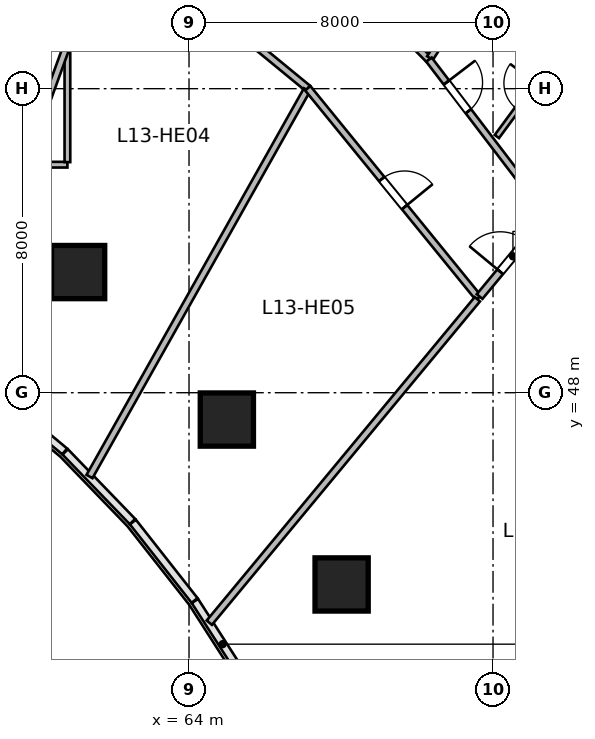
"""IFC4 building model, lengths in metres.
Left out: names, types, materials, properties, quantities, classifications, styles, units other than length and angle.
Written with IfcOpenShell. Run it as: python <this file> out.ifc"""

import sys

from ifc_helpers import new_model, si_unit, direction, frame, frame_2d, origin, origin_2d, place, context, subcontext, project, spatial, rectangle, circle, extrude, source, transform, mapped, element, fill, save


model = new_model("IFC4")
c1 = context("Model", 3, precision=1e-05, world=origin(), true_north=direction((0.0, 1.0)))
c2 = subcontext(c1, "Body", "Model", "MODEL_VIEW")
j1 = project(units=[si_unit("LENGTHUNIT", "METRE"), si_unit("PLANEANGLEUNIT", "RADIAN")], contexts=[c1])
p1 = place(None, origin())
s1 = spatial("IfcSite", under=j1, at=p1, CompositionType="ELEMENT")
p2 = place(p1, origin())
s2 = spatial("IfcBuilding", under=s1, at=p2, CompositionType="ELEMENT")
p3 = place(p2, frame((0.0, 0.0, 60.6)))
s3 = spatial("IfcBuildingStorey", under=s2, at=p3, CompositionType="ELEMENT", Elevation=60.6)
m1 = source(origin(), c2, "Body", "SweptSolid", [
    extrude(circle(Radius=0.7, at=origin_2d()), origin(), (0.0, 0.0, 1.0), 3.6),
])
for number, where, z_axis, x_axis in (
    (1, (61.082, 51.175, 0.0), (0.0, 0.0, 1.0), (0.409, 0.912, 0.0)),
    (2, (64.996, 47.294, 0.0), (0.0, 0.0, 1.0), (0.558, 0.83, 0.0)),
    (3, (68.015, 42.955, 0.0), (0.0, 0.0, 1.0), (0.691, 0.723, 0.0)),
):
    element("IfcColumn", number, at=place(p3, frame(where, z_axis=z_axis, x_axis=x_axis)), inside=s3, PredefinedType="COLUMN", context=c2, shape_type="MappedRepresentation", body=[
        mapped(m1, transform((0.0, 0.0, 0.0), scale=1.0)),
    ])
m2 = source(origin(), c2, "Body", "SweptSolid", [
    extrude(rectangle(XDim=6.6, YDim=0.15, at=frame_2d((3.3, 0.0))), origin(), (0.0, 0.0, 1.0), 2.803),
])
p4 = place(p3, frame((54.2, 54.0, 0.0), z_axis=(0.0, 0.0, 1.0), x_axis=(1.0, 0.0, 0.0)))
e4 = element("IfcWall", 4, at=p4, inside=s3, PredefinedType="PARTITIONING", context=c2, shape_type="MappedRepresentation", body=[
    mapped(m2, transform((0.0, 0.0, 0.0), scale=1.0)),
])
m3 = source(origin(), c2, "Body", "SweptSolid", [
    extrude(rectangle(XDim=3.785, YDim=0.15, at=frame_2d((1.893, 0.0))), origin(), (0.0, 0.0, 1.0), 3.36),
])
p5 = place(p3, frame((60.8, 54.067, 0.0), z_axis=(0.0, 0.0, 1.0), x_axis=(0.0, 1.0, 0.0)))
e5 = element("IfcWall", 5, at=p5, inside=s3, PredefinedType="PARTITIONING", context=c2, shape_type="MappedRepresentation", body=[
    mapped(m3, transform((0.0, 0.0, 0.0), scale=1.0)),
])
m4 = source(origin(), c2, "Body", "SweptSolid", [
    extrude(rectangle(XDim=5.012, YDim=0.18, at=frame_2d((2.506, 0.0))), origin(), (0.0, 0.0, 1.0), 3.36),
])
p6 = place(p3, frame((66.788, 60.326, 0.0), z_axis=(0.0, 0.0, 1.0), x_axis=(0.703664626435, -0.710532260707, 0.0)))
e6 = element("IfcWall", 6, at=p6, inside=s3, PredefinedType="PLUMBINGWALL", context=c2, shape_type="MappedRepresentation", body=[
    mapped(m4, transform((0.0, 0.0, 0.0), scale=1.0)),
])
p7 = place(p6, frame((0.728, 0.0, 0.0)))
e7 = element("IfcOpeningElement", 7, at=p7, cuts=e6, PredefinedType="OPENING", context=c2, shape_type="SweptSolid", body=[
    extrude(rectangle(XDim=0.95, YDim=2.15, at=frame_2d((0.475, 1.075))), frame((0.0, 0.1, 0.0), z_axis=(0.0, -1.0, 0.0), x_axis=(1.0, 0.0, 0.0)), (0.0, 0.0, 1.0), 0.2),
])
m5 = source(origin(), c2, "Body", "SweptSolid", [
    extrude(rectangle(XDim=11.432, YDim=0.18, at=frame_2d((5.716, 0.0))), origin(), (0.0, 0.0, 1.0), 3.36),
])
p8 = place(p3, frame((70.341, 56.805, 0.0), z_axis=(0.0, 0.0, 1.0), x_axis=(0.540196183124, 0.841539115988, 0.0)))
e8 = element("IfcWall", 8, at=p8, inside=s3, PredefinedType="PLUMBINGWALL", context=c2, shape_type="MappedRepresentation", body=[
    mapped(m5, transform((0.0, 0.0, 0.0), scale=1.0)),
])
m6 = source(origin(), c2, "Body", "SweptSolid", [
    extrude(rectangle(XDim=5.135, YDim=0.18, at=frame_2d((2.567, 0.0))), origin(), (0.0, 0.0, 1.0), 3.36),
])
p9 = place(p3, frame((70.315, 56.764, 0.0), z_axis=(0.0, 0.0, 1.0), x_axis=(0.606802199649, -0.794852873494, 0.0)))
e9 = element("IfcWall", 9, at=p9, inside=s3, PredefinedType="PLUMBINGWALL", context=c2, shape_type="MappedRepresentation", body=[
    mapped(m6, transform((0.0, 0.0, 0.0), scale=1.0)),
])
p10 = place(p9, frame((0.757, 0.0, 0.0)))
e10 = element("IfcOpeningElement", 10, at=p10, cuts=e9, PredefinedType="OPENING", context=c2, shape_type="SweptSolid", body=[
    extrude(rectangle(XDim=0.95, YDim=2.15, at=frame_2d((0.475, 1.075))), frame((0.0, 0.1, 0.0), z_axis=(0.0, -1.0, 0.0), x_axis=(1.0, 0.0, 0.0)), (0.0, 0.0, 1.0), 0.2),
])
m7 = source(origin(), c2, "Body", "SweptSolid", [
    extrude(rectangle(XDim=2.642, YDim=0.14, at=frame_2d((1.321, 0.0))), origin(), (0.0, 0.0, 1.0), 3.36),
])
p11 = place(p3, frame((72.101, 54.741, 0.0), z_axis=(0.0, 0.0, 1.0), x_axis=(0.592789122423, 0.805357719487, 0.0)))
e11 = element("IfcWall", 11, at=p11, inside=s3, PredefinedType="PARTITIONING", context=c2, shape_type="MappedRepresentation", body=[
    mapped(m7, transform((0.0, 0.0, 0.0), scale=1.0)),
])
p12 = place(p11, frame((0.896, 0.0, 0.0)))
e12 = element("IfcOpeningElement", 12, at=p12, cuts=e11, PredefinedType="OPENING", context=c2, shape_type="SweptSolid", body=[
    extrude(rectangle(XDim=0.85, YDim=2.05, at=frame_2d((0.425, 1.025))), frame((0.0, 0.08, 0.0), z_axis=(0.0, -1.0, 0.0), x_axis=(1.0, 0.0, 0.0)), (0.0, 0.0, 1.0), 0.16),
])
m8 = source(origin(), c2, "Body", "SweptSolid", [
    extrude(rectangle(XDim=6.721, YDim=0.18, at=frame_2d((3.361, 0.0))), origin(), (0.0, 0.0, 1.0), 3.36),
])
p13 = place(p3, frame((61.931, 60.275, 0.0), z_axis=(0.0, 0.0, 1.0), x_axis=(0.772828051199, -0.63461547671, 0.0)))
e13 = element("IfcWall", 13, at=p13, inside=s3, PredefinedType="PLUMBINGWALL", context=c2, shape_type="MappedRepresentation", body=[
    mapped(m8, transform((0.0, 0.0, 0.0), scale=1.0)),
])
p14 = place(p13, frame((2.885, 0.0, 0.0)))
e14 = element("IfcOpeningElement", 14, at=p14, cuts=e13, PredefinedType="OPENING", context=c2, shape_type="SweptSolid", body=[
    extrude(rectangle(XDim=0.95, YDim=2.15, at=frame_2d((0.475, 1.075))), frame((0.0, 0.1, 0.0), z_axis=(0.0, -1.0, 0.0), x_axis=(1.0, 0.0, 0.0)), (0.0, 0.0, 1.0), 0.2),
])
m9 = source(origin(), c2, "Body", "SweptSolid", [
    extrude(rectangle(XDim=12.196, YDim=0.18, at=frame_2d((6.098, 0.0))), origin(), (0.0, 0.0, 1.0), 3.36),
])
p15 = place(p3, frame((57.742, 48.766, 0.0), z_axis=(0.0, 0.0, 1.0), x_axis=(0.342022711534, 0.939691686031, 0.0)))
e15 = element("IfcWall", 15, at=p15, inside=s3, PredefinedType="PLUMBINGWALL", context=c2, shape_type="MappedRepresentation", body=[
    mapped(m9, transform((0.0, 0.0, 0.0), scale=1.0)),
])
m10 = source(origin(), c2, "Body", "SweptSolid", [
    extrude(rectangle(XDim=11.67, YDim=0.18, at=frame_2d((5.835, 0.0))), origin(), (0.0, 0.0, 1.0), 3.36),
])
p16 = place(p3, frame((61.381, 45.795, 0.0), z_axis=(0.0, 0.0, 1.0), x_axis=(0.490156946222, 0.871634193954, 0.0)))
e16 = element("IfcWall", 16, at=p16, inside=s3, PredefinedType="PLUMBINGWALL", context=c2, shape_type="MappedRepresentation", body=[
    mapped(m10, transform((0.0, 0.0, 0.0), scale=1.0)),
])
m11 = source(origin(), c2, "Body", "SweptSolid", [
    extrude(rectangle(XDim=7.113, YDim=0.18, at=frame_2d((3.556, 0.0))), origin(), (0.0, 0.0, 1.0), 3.36),
])
p17 = place(p3, frame((67.126, 56.01, 0.0), z_axis=(0.0, 0.0, 1.0), x_axis=(0.63149032532, -0.775383755974, 0.0)))
e17 = element("IfcWall", 17, at=p17, inside=s3, PredefinedType="PLUMBINGWALL", context=c2, shape_type="MappedRepresentation", body=[
    mapped(m11, transform((0.0, 0.0, 0.0), scale=1.0)),
])
p18 = place(p17, frame((3.081, 0.0, 0.0)))
e18 = element("IfcOpeningElement", 18, at=p18, cuts=e17, PredefinedType="OPENING", context=c2, shape_type="SweptSolid", body=[
    extrude(rectangle(XDim=0.95, YDim=2.15, at=frame_2d((0.475, 1.075))), frame((0.0, 0.1, 0.0), z_axis=(0.0, -1.0, 0.0), x_axis=(1.0, 0.0, 0.0)), (0.0, 0.0, 1.0), 0.2),
])
m12 = source(origin(), c2, "Body", "SweptSolid", [
    extrude(rectangle(XDim=11.053, YDim=0.18, at=frame_2d((5.527, 0.0))), origin(), (0.0, 0.0, 1.0), 3.36),
])
p19 = place(p3, frame((64.534, 41.949, 0.0), z_axis=(0.0, 0.0, 1.0), x_axis=(0.638131235571, 0.769927611005, 0.0)))
e19 = element("IfcWall", 19, at=p19, inside=s3, PredefinedType="PLUMBINGWALL", context=c2, shape_type="MappedRepresentation", body=[
    mapped(m12, transform((0.0, 0.0, 0.0), scale=1.0)),
])
m13 = source(origin(), c2, "Body", "SweptSolid", [
    extrude(rectangle(XDim=2.748, YDim=0.195, at=frame_2d((1.374, 0.0))), origin(), (0.0, 0.0, 1.0), 3.36),
])
p20 = place(p3, frame((71.647, 50.531, 0.0), z_axis=(0.0, 0.0, 1.0), x_axis=(0.638111168284, 0.769944242729, 0.0)))
e20 = element("IfcWall", 20, at=p20, inside=s3, PredefinedType="PARTITIONING", context=c2, shape_type="MappedRepresentation", body=[
    mapped(m13, transform((0.0, 0.0, 0.0), scale=1.0)),
])
p21 = place(p20, frame((0.849, 0.0, 0.0)))
e21 = element("IfcOpeningElement", 21, at=p21, cuts=e20, PredefinedType="OPENING", context=c2, shape_type="SweptSolid", body=[
    extrude(rectangle(XDim=1.05, YDim=2.15, at=frame_2d((0.525, 1.075))), frame((0.0, 0.107, 0.0), z_axis=(0.0, -1.0, 0.0), x_axis=(1.0, 0.0, 0.0)), (0.0, 0.0, 1.0), 0.215),
])
m14 = source(origin(), c2, "Body", "SweptSolid", [
    extrude(rectangle(XDim=0.95, YDim=2.15, at=frame_2d((0.475, 1.075))), frame((0.0, 0.025, 0.0), z_axis=(0.0, -1.0, 0.0), x_axis=(1.0, 0.0, 0.0)), (0.0, 0.0, 1.0), 0.05),
])
p22 = place(p10, origin())
e22 = element("IfcDoor", 22, at=p22, inside=s3, OperationType="SINGLE_SWING_LEFT", PredefinedType="DOOR", context=c2, shape_type="MappedRepresentation", body=[
    mapped(m14, transform((0.0, 0.0, 0.0), scale=1.0)),
])
fill(e10, e22)
p23 = place(p18, origin())
e23 = element("IfcDoor", 23, at=p23, inside=s3, OperationType="SINGLE_SWING_RIGHT", PredefinedType="DOOR", context=c2, shape_type="MappedRepresentation", body=[
    mapped(m14, transform((0.0, 0.0, 0.0), scale=1.0)),
])
fill(e18, e23)
m15 = source(origin(), c2, "Body", "SweptSolid", [
    extrude(rectangle(XDim=1.05, YDim=2.15, at=frame_2d((0.525, 1.075))), frame((0.0, 0.025, 0.0), z_axis=(0.0, -1.0, 0.0), x_axis=(1.0, 0.0, 0.0)), (0.0, 0.0, 1.0), 0.05),
])
p24 = place(p21, origin())
e24 = element("IfcDoor", 24, at=p24, inside=s3, OperationType="SINGLE_SWING_LEFT", PredefinedType="DOOR", context=c2, shape_type="MappedRepresentation", body=[
    mapped(m15, transform((0.0, 0.0, 0.0), scale=1.0)),
])
fill(e21, e24)
save(model, sys.argv[1])
